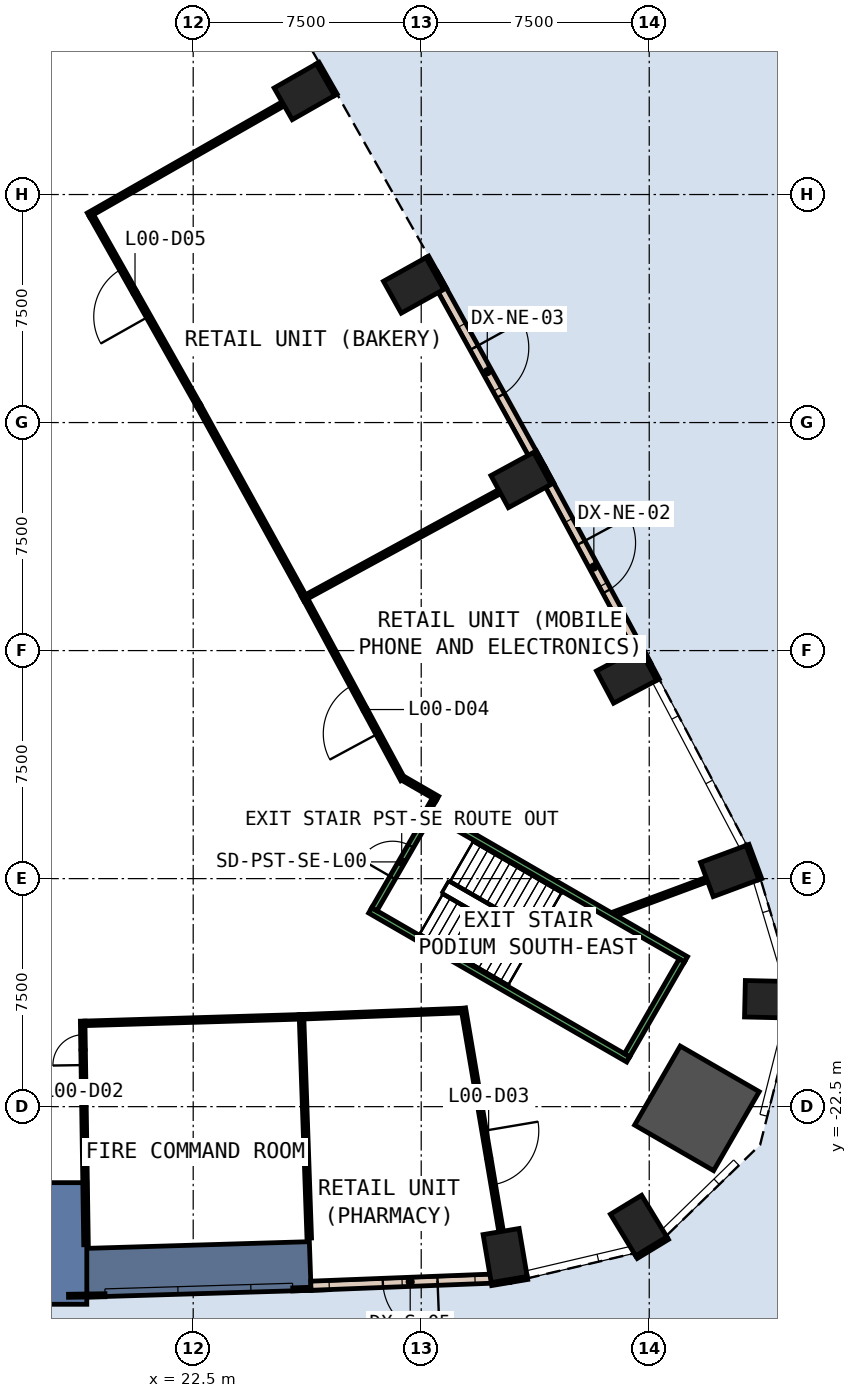
"""IFC4 building model, lengths in metres.
Left out: names, types, materials, properties, quantities, classifications, styles, units other than length and angle.
Written with IfcOpenShell. Run it as: python <this file> out.ifc"""

import sys

from ifc_helpers import new_model, si_unit, direction, frame, frame_2d, origin, origin_2d, place, context, subcontext, project, spatial, polyline, rectangle, outline, extrude, element, fill, save


model = new_model("IFC4")
c1 = context("Model", 3, precision=1e-05, world=origin(), true_north=direction((0.0, 1.0)))
c2 = subcontext(c1, "Body", "Model", "MODEL_VIEW")
j1 = project(units=[si_unit("LENGTHUNIT", "METRE"), si_unit("PLANEANGLEUNIT", "RADIAN")], contexts=[c1])
p1 = place(None, origin())
s1 = spatial("IfcSite", under=j1, at=p1, CompositionType="ELEMENT")
p2 = place(p1, origin())
s2 = spatial("IfcBuilding", under=s1, at=p2, CompositionType="ELEMENT")
p3 = place(p2, origin())
s3 = spatial("IfcBuildingStorey", under=s2, at=p3, CompositionType="ELEMENT", Elevation=0.0)
for number, where, z_axis, x_axis in (
    (1, (32.761, -27.397, -0.5), (0.0, 0.0, 1.0), (0.986, 0.167, 0.0)),
    (2, (37.152, -26.411, -0.5), (0.0, 0.0, 1.0), (0.855, 0.519, 0.0)),
):
    element("IfcColumn", number, at=place(p3, frame(where, z_axis=z_axis, x_axis=x_axis)), inside=s3, PredefinedType="COLUMN", context=c2, shape_type="SweptSolid", body=[
        extrude(rectangle(XDim=1.2, YDim=1.6, at=origin_2d()), origin(), (0.0, 0.0, 1.0), 9.05),
    ])
p4 = place(p3, frame((39.069, -22.556, -0.5), z_axis=(0.0, 0.0, 1.0), x_axis=(-0.866025403784, 0.5, 0.0)))
e3 = element("IfcColumn", 3, at=p4, inside=s3, PredefinedType="COLUMN", context=c2, shape_type="SweptSolid", body=[
    extrude(rectangle(XDim=3.0, YDim=3.0, at=origin_2d()), origin(), (0.0, 0.0, 1.0), 9.05),
])
for number, where, z_axis, x_axis in (
    (4, (41.448, -18.969, -0.5), (0.0, 0.0, 1.0), (0.023, 1.0, 0.0)),
    (5, (40.147, -14.751, -0.5), (0.0, 0.0, 1.0), (-0.348, 0.937, 0.0)),
    (6, (36.753, -8.325, -0.5), (0.0, 0.0, 1.0), (-0.469, 0.883, 0.0)),
    (7, (33.283, -1.889, -0.5), (0.0, 0.0, 1.0), (-0.478, 0.878, 0.0)),
    (8, (29.75, 4.512, -0.5), (0.0, 0.0, 1.0), (-0.487, 0.873, 0.0)),
    (9, (26.155, 10.88, -0.5), (0.0, 0.0, 1.0), (-0.496, 0.869, 0.0)),
):
    element("IfcColumn", number, at=place(p3, frame(where, z_axis=z_axis, x_axis=x_axis)), inside=s3, PredefinedType="COLUMN", context=c2, shape_type="SweptSolid", body=[
        extrude(rectangle(XDim=1.2, YDim=1.6, at=origin_2d()), origin(), (0.0, 0.0, 1.0), 9.05),
    ])
p5 = place(p3, frame((0.0, 0.0, -0.5)))
e10 = element("IfcWall", 10, at=p5, inside=s3, PredefinedType="SHEAR", context=c2, shape_type="SweptSolid", body=[
    extrude(outline(polyline([(19.0, -28.762), (26.377, -28.54), (26.321, -26.941), (18.976, -27.162), (19.0, -28.762)])), origin(), (0.0, 0.0, 1.0), 9.05),
])
p6 = place(p3, frame((-19.0, -25.0, 34.4), z_axis=(0.0, 1.0, 0.0), x_axis=(1.0, 0.0, 0.0)))
e11 = element("IfcWall", 11, at=p6, inside=s3, PredefinedType="SHEAR", context=c2, shape_type="SweptSolid", body=[
    extrude(outline(polyline([(0.0, 0.0), (38.0, 0.0), (38.0, 34.4), (34.0, 34.4), (34.0, 18.4), (33.062, 14.572), (32.125, 13.075), (31.188, 11.987), (30.25, 11.124), (29.312, 10.412), (28.375, 9.813), (27.438, 9.305), (26.5, 8.874), (25.562, 8.509), (24.625, 8.203), (23.688, 7.951), (22.75, 7.749), (21.812, 7.595), (20.875, 7.486), (19.938, 7.422), (19.0, 7.4), (18.062, 7.422), (17.125, 7.486), (16.188, 7.595), (15.25, 7.749), (14.312, 7.951), (13.375, 8.203), (12.438, 8.509), (11.5, 8.874), (10.562, 9.305), (9.625, 9.813), (8.688, 10.412), (7.75, 11.124), (6.812, 11.987), (5.875, 13.075), (4.938, 14.572), (4.0, 18.4), (4.0, 34.4), (0.0, 34.4), (0.0, 0.0)])), origin(), (0.0, 0.0, -1.0), 4.0),
])
p7 = place(p3, frame((41.153, -15.018, 0.0), z_axis=(0.0, 0.0, 1.0), x_axis=(-0.348268249601, 0.937394914814, 0.0)))
e12 = element("IfcWall", 12, at=p7, inside=s3, PredefinedType="STANDARD", context=c2, shape_type="SweptSolid", body=[
    extrude(rectangle(XDim=1.2, YDim=0.1, at=frame_2d((0.6, 0.0))), origin(), (0.0, 0.0, 1.0), 8.55),
])
p8 = place(p3, frame((37.785, -8.456, 0.0), z_axis=(0.0, 0.0, 1.0), x_axis=(-0.469383408131, 0.882994459876, 0.0)))
e13 = element("IfcWall", 13, at=p8, inside=s3, PredefinedType="STANDARD", context=c2, shape_type="SweptSolid", body=[
    extrude(rectangle(XDim=1.199, YDim=0.1, at=frame_2d((0.6, 0.0))), origin(), (0.0, 0.0, 1.0), 8.55),
])
p9 = place(p3, frame((34.316, -2.01, 0.0), z_axis=(0.0, 0.0, 1.0), x_axis=(-0.478267644701, 0.878214131082, 0.0)))
e14 = element("IfcWall", 14, at=p9, inside=s3, PredefinedType="STANDARD", context=c2, shape_type="SweptSolid", body=[
    extrude(rectangle(XDim=1.2, YDim=0.1, at=frame_2d((0.6, 0.0))), origin(), (0.0, 0.0, 1.0), 8.55),
])
p10 = place(p3, frame((30.784, 4.402, 0.0), z_axis=(0.0, 0.0, 1.0), x_axis=(-0.486817526853, 0.873503689488, 0.0)))
e15 = element("IfcWall", 15, at=p10, inside=s3, PredefinedType="STANDARD", context=c2, shape_type="SweptSolid", body=[
    extrude(rectangle(XDim=1.2, YDim=0.1, at=frame_2d((0.6, 0.0))), origin(), (0.0, 0.0, 1.0), 8.55),
])
p11 = place(p3, frame((27.191, 10.78, 0.0), z_axis=(0.0, 0.0, 1.0), x_axis=(-0.495854054996, 0.868405870629, 0.0)))
e16 = element("IfcWall", 16, at=p11, inside=s3, PredefinedType="STANDARD", context=c2, shape_type="SweptSolid", body=[
    extrude(rectangle(XDim=1.2, YDim=0.1, at=frame_2d((0.6, 0.0))), origin(), (0.0, 0.0, 1.0), 8.55),
])
p12 = place(p3, frame((18.399, -28.721, 0.0), z_axis=(0.0, 0.0, 1.0), x_axis=(0.999886724523, 0.015051183404, 0.0)))
e17 = element("IfcWall", 17, at=p12, inside=s3, PredefinedType="STANDARD", context=c2, shape_type="SweptSolid", body=[
    extrude(rectangle(XDim=1.2, YDim=0.1, at=frame_2d((0.6, 0.0))), origin(), (0.0, 0.0, 1.0), 8.55),
])
p13 = place(p3, frame((25.776, -28.511, 0.0), z_axis=(0.0, 0.0, 1.0), x_axis=(0.999387493042, 0.034994838926, 0.0)))
e18 = element("IfcWall", 18, at=p13, inside=s3, PredefinedType="STANDARD", context=c2, shape_type="SweptSolid", body=[
    extrude(rectangle(XDim=1.2, YDim=0.1, at=frame_2d((0.6, 0.0))), origin(), (0.0, 0.0, 1.0), 8.55),
])
p14 = place(p3, frame((32.311, -28.335, 0.0), z_axis=(0.0, 0.0, 1.0), x_axis=(0.986011774526, 0.166675674579, 0.0)))
e19 = element("IfcWall", 19, at=p14, inside=s3, PredefinedType="STANDARD", context=c2, shape_type="SweptSolid", body=[
    extrude(rectangle(XDim=1.2, YDim=0.1, at=frame_2d((0.6, 0.0))), origin(), (0.0, 0.0, 1.0), 8.55),
])
p15 = place(p3, frame((37.08, -27.449, 0.0), z_axis=(0.0, 0.0, 1.0), x_axis=(0.854716608594, 0.519094903649, 0.0)))
e20 = element("IfcWall", 20, at=p15, inside=s3, PredefinedType="STANDARD", context=c2, shape_type="SweptSolid", body=[
    extrude(rectangle(XDim=1.2, YDim=0.1, at=frame_2d((0.6, 0.0))), origin(), (0.0, 0.0, 1.0), 8.55),
])
p16 = place(p3, frame((32.906, -28.134, 0.0), z_axis=(0.0, 0.0, 1.0), x_axis=(-0.999234642094, -0.039116876654, 0.0)))
e21 = element("IfcWall", 21, at=p16, inside=s3, PredefinedType="STANDARD", context=c2, shape_type="SweptSolid", body=[
    extrude(rectangle(XDim=6.541, YDim=0.3, at=frame_2d((3.271, 0.0))), origin(), (0.0, 0.0, 1.0), 3.0),
])
p17 = place(p16, frame((2.371, 0.0, 0.0)))
e22 = element("IfcOpeningElement", 22, at=p17, cuts=e21, PredefinedType="OPENING", context=c2, shape_type="SweptSolid", body=[
    extrude(rectangle(XDim=1.8, YDim=2.4, at=frame_2d((0.9, 1.2))), frame((0.0, 0.16, 0.0), z_axis=(0.0, -1.0, 0.0), x_axis=(1.0, 0.0, 0.0)), (0.0, 0.0, 1.0), 0.32),
])
p18 = place(p3, frame((33.94, -1.529, 0.0), z_axis=(0.0, 0.0, 1.0), x_axis=(0.474642442052, -0.880178704698, 0.0)))
e23 = element("IfcWall", 23, at=p18, inside=s3, PredefinedType="STANDARD", context=c2, shape_type="SweptSolid", body=[
    extrude(rectangle(XDim=7.323, YDim=0.3, at=frame_2d((3.662, 0.0))), origin(), (0.0, 0.0, 1.0), 3.0),
])
p19 = place(p18, frame((2.762, 0.0, 0.0)))
e24 = element("IfcOpeningElement", 24, at=p19, cuts=e23, PredefinedType="OPENING", context=c2, shape_type="SweptSolid", body=[
    extrude(rectangle(XDim=1.8, YDim=2.4, at=frame_2d((0.9, 1.2))), frame((0.0, 0.16, 0.0), z_axis=(0.0, -1.0, 0.0), x_axis=(1.0, 0.0, 0.0)), (0.0, 0.0, 1.0), 0.32),
])
p20 = place(p3, frame((30.404, 4.878, 0.0), z_axis=(0.0, 0.0, 1.0), x_axis=(0.483217499531, -0.875500341603, 0.0)))
e25 = element("IfcWall", 25, at=p20, inside=s3, PredefinedType="STANDARD", context=c2, shape_type="SweptSolid", body=[
    extrude(rectangle(XDim=7.322, YDim=0.3, at=frame_2d((3.661, 0.0))), origin(), (0.0, 0.0, 1.0), 3.0),
])
p21 = place(p20, frame((2.761, 0.0, 0.0)))
e26 = element("IfcOpeningElement", 26, at=p21, cuts=e25, PredefinedType="OPENING", context=c2, shape_type="SweptSolid", body=[
    extrude(rectangle(XDim=1.8, YDim=2.4, at=frame_2d((0.9, 1.2))), frame((0.0, 0.16, 0.0), z_axis=(0.0, -1.0, 0.0), x_axis=(1.0, 0.0, 0.0)), (0.0, 0.0, 1.0), 0.32),
])
p22 = place(p3, frame((26.06, -19.47, 0.0), z_axis=(0.0, 0.0, 1.0), x_axis=(0.034912620967, -0.999390368623, 0.0)))
e27 = element("IfcWall", 27, at=p22, inside=s3, PredefinedType="PARTITIONING", context=c2, shape_type="SweptSolid", body=[
    extrude(rectangle(XDim=7.356, YDim=0.15, at=frame_2d((3.678, 0.0))), origin(), (0.0, 0.0, 1.0), 8.55),
])
p23 = place(p3, frame((18.975, -27.042, 0.0), z_axis=(0.0, 0.0, 1.0), x_axis=(-0.015101510801, 0.999885965684, 0.0)))
e28 = element("IfcWall", 28, at=p23, inside=s3, PredefinedType="PARTITIONING", context=c2, shape_type="SweptSolid", body=[
    extrude(rectangle(XDim=7.356, YDim=0.15, at=frame_2d((3.678, 0.0))), origin(), (0.0, 0.0, 1.0), 8.55),
])
p24 = place(p23, frame((5.91, 0.0, 0.0)))
e29 = element("IfcOpeningElement", 29, at=p24, cuts=e28, PredefinedType="OPENING", context=c2, shape_type="SweptSolid", body=[
    extrude(rectangle(XDim=1.0, YDim=2.1, at=frame_2d((0.5, 1.05))), frame((0.0, 0.085, 0.0), z_axis=(0.0, -1.0, 0.0), x_axis=(1.0, 0.0, 0.0)), (0.0, 0.0, 1.0), 0.17),
])
p25 = place(p3, frame((18.94, -19.76, 0.0), z_axis=(0.0, 0.0, 1.0), x_axis=(0.999544128502, 0.030191640862, 0.0)))
e30 = element("IfcWall", 30, at=p25, inside=s3, PredefinedType="PARTITIONING", context=c2, shape_type="SweptSolid", body=[
    extrude(rectangle(XDim=7.051, YDim=0.15, at=frame_2d((3.526, 0.0))), origin(), (0.0, 0.0, 1.0), 8.55),
])
p26 = place(p3, frame((26.14, -19.542, 0.0), z_axis=(0.0, 0.0, 1.0), x_axis=(0.99924214326, 0.038924788152, 0.0)))
e31 = element("IfcWall", 31, at=p26, inside=s3, PredefinedType="PARTITIONING", context=c2, shape_type="SweptSolid", body=[
    extrude(rectangle(XDim=5.187, YDim=0.15, at=frame_2d((2.594, 0.0))), origin(), (0.0, 0.0, 1.0), 8.55),
])
p27 = place(p3, frame((31.385, -19.263, 0.0), z_axis=(0.0, 0.0, 1.0), x_axis=(0.166908436499, -0.985972400134, 0.0)))
e32 = element("IfcWall", 32, at=p27, inside=s3, PredefinedType="PARTITIONING", context=c2, shape_type="SweptSolid", body=[
    extrude(rectangle(XDim=7.429, YDim=0.15, at=frame_2d((3.715, 0.0))), origin(), (0.0, 0.0, 1.0), 8.55),
])
p28 = place(p27, frame((4.088, 0.0, 0.0)))
e33 = element("IfcOpeningElement", 33, at=p28, cuts=e32, PredefinedType="OPENING", context=c2, shape_type="SweptSolid", body=[
    extrude(rectangle(XDim=1.8, YDim=2.1, at=frame_2d((0.9, 1.05))), frame((0.0, 0.085, 0.0), z_axis=(0.0, -1.0, 0.0), x_axis=(1.0, 0.0, 0.0)), (0.0, 0.0, 1.0), 0.17),
])
p29 = place(p3, frame((26.102, -5.798, 0.0), z_axis=(0.0, 0.0, 1.0), x_axis=(0.878298596042, 0.478112514154, 0.0)))
e34 = element("IfcWall", 34, at=p29, inside=s3, PredefinedType="PARTITIONING", context=c2, shape_type="SweptSolid", body=[
    extrude(rectangle(XDim=7.356, YDim=0.15, at=frame_2d((3.678, 0.0))), origin(), (0.0, 0.0, 1.0), 8.55),
])
p30 = place(p3, frame((39.378, -15.037, 0.0), z_axis=(0.0, 0.0, 1.0), x_axis=(-0.937400028274, -0.348254485961, 0.0)))
e35 = element("IfcWall", 35, at=p30, inside=s3, PredefinedType="PARTITIONING", context=c2, shape_type="SweptSolid", body=[
    extrude(rectangle(XDim=3.247, YDim=0.15, at=frame_2d((1.624, 0.0))), origin(), (0.0, 0.0, 1.0), 8.55),
])
p31 = place(p3, frame((30.235, -12.733, 0.0), z_axis=(0.0, 0.0, 1.0), x_axis=(0.499352927503, 0.866398669086, 0.0)))
e36 = element("IfcWall", 36, at=p31, inside=s3, PredefinedType="PARTITIONING", context=c2, shape_type="SweptSolid", body=[
    extrude(rectangle(XDim=0.4, YDim=0.15, at=frame_2d((0.2, 0.0))), origin(), (0.0, 0.0, 1.0), 8.55),
])
p32 = place(p3, frame((30.537, -12.358, 0.0), z_axis=(0.0, 0.0, 1.0), x_axis=(-0.866283635419, 0.499552462715, 0.0)))
e37 = element("IfcWall", 37, at=p32, inside=s3, PredefinedType="PARTITIONING", context=c2, shape_type="SweptSolid", body=[
    extrude(rectangle(XDim=1.285, YDim=0.15, at=frame_2d((0.643, 0.0))), origin(), (0.0, 0.0, 1.0), 8.55),
])
p33 = place(p3, frame((29.395, -11.745, 0.0), z_axis=(0.0, 0.0, 1.0), x_axis=(-0.474633115633, 0.88018373397, 0.0)))
e38 = element("IfcWall", 38, at=p33, inside=s3, PredefinedType="PARTITIONING", context=c2, shape_type="SweptSolid", body=[
    extrude(rectangle(XDim=6.715, YDim=0.15, at=frame_2d((3.357, 0.0))), origin(), (0.0, 0.0, 1.0), 8.55),
])
p34 = place(p33, frame((1.72, 0.0, 0.0)))
e39 = element("IfcOpeningElement", 39, at=p34, cuts=e38, PredefinedType="OPENING", context=c2, shape_type="SweptSolid", body=[
    extrude(rectangle(XDim=1.8, YDim=2.1, at=frame_2d((0.9, 1.05))), frame((0.0, 0.085, 0.0), z_axis=(0.0, -1.0, 0.0), x_axis=(1.0, 0.0, 0.0)), (0.0, 0.0, 1.0), 0.17),
])
p35 = place(p3, frame((26.132, -5.696, 0.0), z_axis=(0.0, 0.0, 1.0), x_axis=(-0.483214537934, 0.875501976199, 0.0)))
e40 = element("IfcWall", 40, at=p35, inside=s3, PredefinedType="PARTITIONING", context=c2, shape_type="SweptSolid", body=[
    extrude(rectangle(XDim=7.15, YDim=0.15, at=frame_2d((3.575, 0.0))), origin(), (0.0, 0.0, 1.0), 8.55),
])
p36 = place(p3, frame((22.677, 0.564, 0.0), z_axis=(0.0, 0.0, 1.0), x_axis=(-0.491512201124, 0.870870688533, 0.0)))
e41 = element("IfcWall", 41, at=p36, inside=s3, PredefinedType="PARTITIONING", context=c2, shape_type="SweptSolid", body=[
    extrude(rectangle(XDim=7.16, YDim=0.15, at=frame_2d((3.58, 0.0))), origin(), (0.0, 0.0, 1.0), 8.55),
])
p37 = place(p36, frame((3.354, 0.0, 0.0)))
e42 = element("IfcOpeningElement", 42, at=p37, cuts=e41, PredefinedType="OPENING", context=c2, shape_type="SweptSolid", body=[
    extrude(rectangle(XDim=1.8, YDim=2.1, at=frame_2d((0.9, 1.05))), frame((0.0, 0.085, 0.0), z_axis=(0.0, -1.0, 0.0), x_axis=(1.0, 0.0, 0.0)), (0.0, 0.0, 1.0), 0.17),
])
p38 = place(p3, frame((19.055, 6.828, 0.0), z_axis=(0.0, 0.0, 1.0), x_axis=(0.868557545793, 0.495588326786, 0.0)))
e43 = element("IfcWall", 43, at=p38, inside=s3, PredefinedType="PARTITIONING", context=c2, shape_type="SweptSolid", body=[
    extrude(rectangle(XDim=7.355, YDim=0.15, at=frame_2d((3.677, 0.0))), origin(), (0.0, 0.0, 1.0), 8.55),
])
for number, where, z_axis, x_axis in (
    (44, (28.322, -16.045, 0.0), (0.0, 0.0, 1.0), (0.866, -0.5, 0.0)),
    (45, (30.222, -12.755, 0.0), (0.0, 0.0, 1.0), (0.866, -0.5, 0.0)),
):
    element("IfcWall", number, at=place(p3, frame(where, z_axis=z_axis, x_axis=x_axis)), inside=s3, PredefinedType="STANDARD", context=c2, shape_type="SweptSolid", body=[
        extrude(rectangle(XDim=9.8, YDim=0.2, at=frame_2d((4.9, 0.0))), origin(), (0.0, 0.0, 1.0), 8.55),
    ])
p39 = place(p3, frame((28.458, -16.009, 0.0), z_axis=(0.0, 0.0, 1.0), x_axis=(0.499982693035, 0.866035395735, 0.0)))
e46 = element("IfcWall", 46, at=p39, inside=s3, PredefinedType="STANDARD", context=c2, shape_type="SweptSolid", body=[
    extrude(rectangle(XDim=3.6, YDim=0.2, at=frame_2d((1.8, 0.0))), origin(), (0.0, 0.0, 1.0), 8.55),
])
p40 = place(p39, frame((1.2, 0.0, 0.0)))
e47 = element("IfcOpeningElement", 47, at=p40, cuts=e46, PredefinedType="OPENING", context=c2, shape_type="SweptSolid", body=[
    extrude(rectangle(XDim=1.2, YDim=2.2, at=frame_2d((0.6, 1.1))), frame((0.0, 0.11, 0.0), z_axis=(0.0, -1.0, 0.0), x_axis=(1.0, 0.0, 0.0)), (0.0, 0.0, 1.0), 0.22),
])
p41 = place(p3, frame((36.772, -20.809, 0.0), z_axis=(0.0, 0.0, 1.0), x_axis=(0.49995333141, 0.866052346231, 0.0)))
e48 = element("IfcWall", 48, at=p41, inside=s3, PredefinedType="STANDARD", context=c2, shape_type="SweptSolid", body=[
    extrude(rectangle(XDim=3.6, YDim=0.2, at=frame_2d((1.8, 0.0))), origin(), (0.0, 0.0, 1.0), 8.55),
])
p42 = place(p17, origin())
e49 = element("IfcDoor", 49, at=p42, inside=s3, OperationType="DOUBLE_DOOR_SINGLE_SWING", PredefinedType="DOOR", context=c2, shape_type="SweptSolid", body=[
    extrude(rectangle(XDim=1.8, YDim=2.4, at=frame_2d((0.9, 1.2))), frame((0.0, 0.025, 0.0), z_axis=(0.0, -1.0, 0.0), x_axis=(1.0, 0.0, 0.0)), (0.0, 0.0, 1.0), 0.05),
])
fill(e22, e49)
p43 = place(p19, origin())
e50 = element("IfcDoor", 50, at=p43, inside=s3, OperationType="DOUBLE_DOOR_SINGLE_SWING", PredefinedType="DOOR", context=c2, shape_type="SweptSolid", body=[
    extrude(rectangle(XDim=1.8, YDim=2.4, at=frame_2d((0.9, 1.2))), frame((0.0, 0.025, 0.0), z_axis=(0.0, -1.0, 0.0), x_axis=(1.0, 0.0, 0.0)), (0.0, 0.0, 1.0), 0.05),
])
fill(e24, e50)
p44 = place(p21, origin())
e51 = element("IfcDoor", 51, at=p44, inside=s3, OperationType="DOUBLE_DOOR_SINGLE_SWING", PredefinedType="DOOR", context=c2, shape_type="SweptSolid", body=[
    extrude(rectangle(XDim=1.8, YDim=2.4, at=frame_2d((0.9, 1.2))), frame((0.0, 0.025, 0.0), z_axis=(0.0, -1.0, 0.0), x_axis=(1.0, 0.0, 0.0)), (0.0, 0.0, 1.0), 0.05),
])
fill(e26, e51)
p45 = place(p24, origin())
e52 = element("IfcDoor", 52, at=p45, inside=s3, OperationType="SINGLE_SWING_LEFT", PredefinedType="DOOR", context=c2, shape_type="SweptSolid", body=[
    extrude(rectangle(XDim=1.0, YDim=2.1, at=frame_2d((0.5, 1.05))), frame((0.0, 0.025, 0.0), z_axis=(0.0, -1.0, 0.0), x_axis=(1.0, 0.0, 0.0)), (0.0, 0.0, 1.0), 0.05),
])
fill(e29, e52)
p46 = place(p28, origin())
e53 = element("IfcDoor", 53, at=p46, inside=s3, OperationType="DOUBLE_DOOR_SINGLE_SWING", PredefinedType="DOOR", context=c2, shape_type="SweptSolid", body=[
    extrude(rectangle(XDim=1.8, YDim=2.1, at=frame_2d((0.9, 1.05))), frame((0.0, 0.025, 0.0), z_axis=(0.0, -1.0, 0.0), x_axis=(1.0, 0.0, 0.0)), (0.0, 0.0, 1.0), 0.05),
])
fill(e33, e53)
p47 = place(p34, origin())
e54 = element("IfcDoor", 54, at=p47, inside=s3, OperationType="DOUBLE_DOOR_SINGLE_SWING", PredefinedType="DOOR", context=c2, shape_type="SweptSolid", body=[
    extrude(rectangle(XDim=1.8, YDim=2.1, at=frame_2d((0.9, 1.05))), frame((0.0, 0.025, 0.0), z_axis=(0.0, -1.0, 0.0), x_axis=(1.0, 0.0, 0.0)), (0.0, 0.0, 1.0), 0.05),
])
fill(e39, e54)
p48 = place(p37, origin())
e55 = element("IfcDoor", 55, at=p48, inside=s3, OperationType="DOUBLE_DOOR_SINGLE_SWING", PredefinedType="DOOR", context=c2, shape_type="SweptSolid", body=[
    extrude(rectangle(XDim=1.8, YDim=2.1, at=frame_2d((0.9, 1.05))), frame((0.0, 0.025, 0.0), z_axis=(0.0, -1.0, 0.0), x_axis=(1.0, 0.0, 0.0)), (0.0, 0.0, 1.0), 0.05),
])
fill(e42, e55)
p49 = place(p40, origin())
e56 = element("IfcDoor", 56, at=p49, inside=s3, OperationType="SINGLE_SWING_LEFT", PredefinedType="DOOR", context=c2, shape_type="SweptSolid", body=[
    extrude(rectangle(XDim=1.2, YDim=2.2, at=frame_2d((0.6, 1.1))), frame((0.0, 0.025, 0.0), z_axis=(0.0, -1.0, 0.0), x_axis=(1.0, 0.0, 0.0)), (0.0, 0.0, 1.0), 0.05),
])
fill(e47, e56)
save(model, sys.argv[1])
